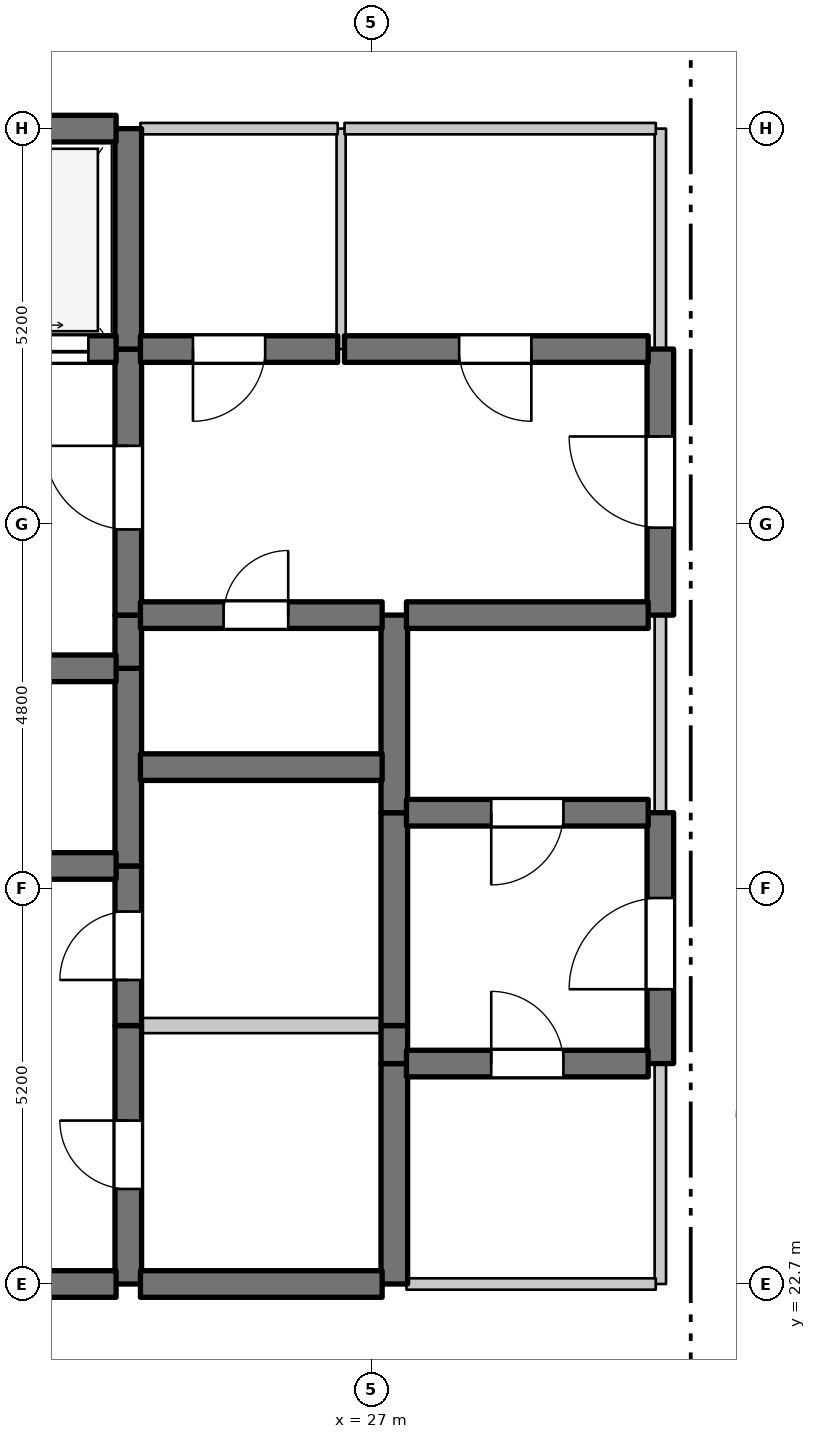
"""IFC4 building model, lengths in metres.
Left out: names, types, materials, properties, quantities, classifications, styles, units other than length and angle.
Written with IfcOpenShell. Run it as: python <this file> out.ifc"""

import sys

from ifc_helpers import new_model, si_unit, direction, frame, frame_2d, origin, place, context, subcontext, project, spatial, rectangle, extrude, element, fill, save


model = new_model("IFC4")
c1 = context("Model", 3, precision=1e-05, world=origin(), true_north=direction((0.0, 1.0)))
c2 = subcontext(c1, "Body", "Model", "MODEL_VIEW")
j1 = project(units=[si_unit("LENGTHUNIT", "METRE"), si_unit("PLANEANGLEUNIT", "RADIAN")], contexts=[c1])
p1 = place(None, origin())
s1 = spatial("IfcSite", under=j1, at=p1, CompositionType="ELEMENT")
p2 = place(p1, origin())
s2 = spatial("IfcBuilding", under=s1, at=p2, CompositionType="ELEMENT")
p3 = place(p2, frame((0.0, 0.0, 314.7)))
s3 = spatial("IfcBuildingStorey", under=s2, at=p3, CompositionType="ELEMENT", Elevation=314.7)
p4 = place(p3, frame((23.8, 22.7, 0.0), z_axis=(0.0, 0.0, 1.0), x_axis=(0.0, 1.0, 0.0)))
e1 = element("IfcWall", 1, at=p4, inside=s3, PredefinedType="SHEAR", context=c2, shape_type="SweptSolid", body=[
    extrude(rectangle(XDim=3.4, YDim=0.35, at=frame_2d((1.7, 0.0))), origin(), (0.0, 0.0, 1.0), 4.99),
])
p5 = place(p4, frame((1.25, 0.0, 0.0)))
e2 = element("IfcOpeningElement", 2, at=p5, cuts=e1, PredefinedType="OPENING", context=c2, shape_type="SweptSolid", body=[
    extrude(rectangle(XDim=0.9, YDim=2.15, at=frame_2d((0.45, 1.075))), frame((0.0, 0.185, 0.0), z_axis=(0.0, -1.0, 0.0), x_axis=(1.0, 0.0, 0.0)), (0.0, 0.0, 1.0), 0.37),
])
p6 = place(p3, frame((23.8, 26.1, 0.0), z_axis=(0.0, 0.0, 1.0), x_axis=(0.0, 1.0, 0.0)))
e3 = element("IfcWall", 3, at=p6, inside=s3, PredefinedType="SHEAR", context=c2, shape_type="SweptSolid", body=[
    extrude(rectangle(XDim=2.1, YDim=0.35, at=frame_2d((1.05, 0.0))), origin(), (0.0, 0.0, 1.0), 4.99),
])
p7 = place(p6, frame((0.6, 0.0, 0.0)))
e4 = element("IfcOpeningElement", 4, at=p7, cuts=e3, PredefinedType="OPENING", context=c2, shape_type="SweptSolid", body=[
    extrude(rectangle(XDim=0.9, YDim=2.15, at=frame_2d((0.45, 1.075))), frame((0.0, 0.185, 0.0), z_axis=(0.0, -1.0, 0.0), x_axis=(1.0, 0.0, 0.0)), (0.0, 0.0, 1.0), 0.37),
])
p8 = place(p3, frame((23.8, 28.2, 0.0), z_axis=(0.0, 0.0, 1.0), x_axis=(0.0, 1.0, 0.0)))
e5 = element("IfcWall", 5, at=p8, inside=s3, PredefinedType="SHEAR", context=c2, shape_type="SweptSolid", body=[
    extrude(rectangle(XDim=2.6, YDim=0.35, at=frame_2d((1.3, 0.0))), origin(), (0.0, 0.0, 1.0), 4.99),
])
p9 = place(p3, frame((23.8, 30.8, 0.0), z_axis=(0.0, 0.0, 1.0), x_axis=(0.0, 1.0, 0.0)))
e6 = element("IfcWall", 6, at=p9, inside=s3, PredefinedType="SHEAR", context=c2, shape_type="SweptSolid", body=[
    extrude(rectangle(XDim=0.7, YDim=0.35, at=frame_2d((0.35, 0.0))), origin(), (0.0, 0.0, 1.0), 4.99),
])
p10 = place(p3, frame((23.8, 31.5, 0.0), z_axis=(0.0, 0.0, 1.0), x_axis=(0.0, 1.0, 0.0)))
e7 = element("IfcWall", 7, at=p10, inside=s3, PredefinedType="SHEAR", context=c2, shape_type="SweptSolid", body=[
    extrude(rectangle(XDim=3.5, YDim=0.35, at=frame_2d((1.75, 0.0))), origin(), (0.0, 0.0, 1.0), 4.99),
])
p11 = place(p10, frame((1.127, 0.0, 0.0)))
e8 = element("IfcOpeningElement", 8, at=p11, cuts=e7, PredefinedType="OPENING", context=c2, shape_type="SweptSolid", body=[
    extrude(rectangle(XDim=1.1, YDim=2.15, at=frame_2d((0.55, 1.075))), frame((0.0, 0.185, 0.0), z_axis=(0.0, -1.0, 0.0), x_axis=(1.0, 0.0, 0.0)), (0.0, 0.0, 1.0), 0.37),
])
p12 = place(p3, frame((23.8, 35.0, 0.0), z_axis=(0.0, 0.0, 1.0), x_axis=(0.0, 1.0, 0.0)))
e9 = element("IfcWall", 9, at=p12, inside=s3, PredefinedType="SHEAR", context=c2, shape_type="SweptSolid", body=[
    extrude(rectangle(XDim=2.9, YDim=0.35, at=frame_2d((1.45, 0.0))), origin(), (0.0, 0.0, 1.0), 4.99),
])
p13 = place(p3, frame((26.6, 35.0, 0.0), z_axis=(0.0, 0.0, 1.0), x_axis=(0.0, 1.0, 0.0)))
e10 = element("IfcWall", 10, at=p13, inside=s3, PredefinedType="PARTITIONING", context=c2, shape_type="SweptSolid", body=[
    extrude(rectangle(XDim=2.9, YDim=0.12, at=frame_2d((1.45, 0.0))), origin(), (0.0, 0.0, 1.0), 4.99),
])
p14 = place(p3, frame((27.3, 22.7, 0.0), z_axis=(0.0, 0.0, 1.0), x_axis=(0.0, 1.0, 0.0)))
e11 = element("IfcWall", 11, at=p14, inside=s3, PredefinedType="SHEAR", context=c2, shape_type="SweptSolid", body=[
    extrude(rectangle(XDim=2.9, YDim=0.35, at=frame_2d((1.45, 0.0))), origin(), (0.0, 0.0, 1.0), 4.99),
])
p15 = place(p3, frame((27.3, 25.6, 0.0), z_axis=(0.0, 0.0, 1.0), x_axis=(0.0, 1.0, 0.0)))
e12 = element("IfcWall", 12, at=p15, inside=s3, PredefinedType="SHEAR", context=c2, shape_type="SweptSolid", body=[
    extrude(rectangle(XDim=0.5, YDim=0.35, at=frame_2d((0.25, 0.0))), origin(), (0.0, 0.0, 1.0), 4.99),
])
p16 = place(p3, frame((27.3, 26.1, 0.0), z_axis=(0.0, 0.0, 1.0), x_axis=(0.0, 1.0, 0.0)))
e13 = element("IfcWall", 13, at=p16, inside=s3, PredefinedType="SHEAR", context=c2, shape_type="SweptSolid", body=[
    extrude(rectangle(XDim=2.8, YDim=0.35, at=frame_2d((1.4, 0.0))), origin(), (0.0, 0.0, 1.0), 4.99),
])
p17 = place(p3, frame((27.3, 28.9, 0.0), z_axis=(0.0, 0.0, 1.0), x_axis=(0.0, 1.0, 0.0)))
e14 = element("IfcWall", 14, at=p17, inside=s3, PredefinedType="SHEAR", context=c2, shape_type="SweptSolid", body=[
    extrude(rectangle(XDim=2.6, YDim=0.35, at=frame_2d((1.3, 0.0))), origin(), (0.0, 0.0, 1.0), 4.99),
])
p18 = place(p3, frame((30.8, 22.7, 0.0), z_axis=(0.0, 0.0, 1.0), x_axis=(0.0, 1.0, 0.0)))
e15 = element("IfcWall", 15, at=p18, inside=s3, PredefinedType="STANDARD", context=c2, shape_type="SweptSolid", body=[
    extrude(rectangle(XDim=2.9, YDim=0.15, at=frame_2d((1.45, 0.0))), origin(), (0.0, 0.0, 1.0), 4.99),
])
p19 = place(p3, frame((30.8, 25.6, 0.0), z_axis=(0.0, 0.0, 1.0), x_axis=(0.0, 1.0, 0.0)))
e16 = element("IfcWall", 16, at=p19, inside=s3, PredefinedType="SHEAR", context=c2, shape_type="SweptSolid", body=[
    extrude(rectangle(XDim=3.3, YDim=0.35, at=frame_2d((1.65, 0.0))), origin(), (0.0, 0.0, 1.0), 4.99),
])
p20 = place(p19, frame((0.978, 0.0, 0.0)))
e17 = element("IfcOpeningElement", 17, at=p20, cuts=e16, PredefinedType="OPENING", context=c2, shape_type="SweptSolid", body=[
    extrude(rectangle(XDim=1.2, YDim=2.2, at=frame_2d((0.6, 1.1))), frame((0.0, 0.185, 0.0), z_axis=(0.0, -1.0, 0.0), x_axis=(1.0, 0.0, 0.0)), (0.0, 0.0, 1.0), 0.37),
])
p21 = place(p3, frame((30.8, 28.9, 0.0), z_axis=(0.0, 0.0, 1.0), x_axis=(0.0, 1.0, 0.0)))
e18 = element("IfcWall", 18, at=p21, inside=s3, PredefinedType="STANDARD", context=c2, shape_type="SweptSolid", body=[
    extrude(rectangle(XDim=2.6, YDim=0.15, at=frame_2d((1.3, 0.0))), origin(), (0.0, 0.0, 1.0), 4.99),
])
p22 = place(p3, frame((30.8, 31.5, 0.0), z_axis=(0.0, 0.0, 1.0), x_axis=(0.0, 1.0, 0.0)))
e19 = element("IfcWall", 19, at=p22, inside=s3, PredefinedType="SHEAR", context=c2, shape_type="SweptSolid", body=[
    extrude(rectangle(XDim=3.5, YDim=0.35, at=frame_2d((1.75, 0.0))), origin(), (0.0, 0.0, 1.0), 4.99),
])
p23 = place(p22, frame((1.15, 0.0, 0.0)))
e20 = element("IfcOpeningElement", 20, at=p23, cuts=e19, PredefinedType="OPENING", context=c2, shape_type="SweptSolid", body=[
    extrude(rectangle(XDim=1.2, YDim=2.2, at=frame_2d((0.6, 1.1))), frame((0.0, 0.185, 0.0), z_axis=(0.0, -1.0, 0.0), x_axis=(1.0, 0.0, 0.0)), (0.0, 0.0, 1.0), 0.37),
])
p24 = place(p3, frame((30.8, 35.0, 0.0), z_axis=(0.0, 0.0, 1.0), x_axis=(0.0, 1.0, 0.0)))
e21 = element("IfcWall", 21, at=p24, inside=s3, PredefinedType="STANDARD", context=c2, shape_type="SweptSolid", body=[
    extrude(rectangle(XDim=2.9, YDim=0.15, at=frame_2d((1.45, 0.0))), origin(), (0.0, 0.0, 1.0), 4.99),
])
p25 = place(p3, frame((19.16, 22.7, 0.0), z_axis=(0.0, 0.0, 1.0), x_axis=(1.0, 0.0, 0.0)))
e22 = element("IfcWall", 22, at=p25, inside=s3, PredefinedType="SHEAR", context=c2, shape_type="SweptSolid", body=[
    extrude(rectangle(XDim=4.48, YDim=0.35, at=frame_2d((2.24, 0.0))), origin(), (0.0, 0.0, 1.0), 4.99),
])
p26 = place(p25, frame((1.64, 0.0, 0.0)))
e23 = element("IfcOpeningElement", 23, at=p26, cuts=e22, PredefinedType="OPENING", context=c2, shape_type="SweptSolid", body=[
    extrude(rectangle(XDim=1.2, YDim=2.2, at=frame_2d((0.6, 1.1))), frame((0.0, 0.185, 0.0), z_axis=(0.0, -1.0, 0.0), x_axis=(1.0, 0.0, 0.0)), (0.0, 0.0, 1.0), 0.37),
])
p27 = place(p3, frame((23.96, 22.7, 0.0), z_axis=(0.0, 0.0, 1.0), x_axis=(1.0, 0.0, 0.0)))
e24 = element("IfcWall", 24, at=p27, inside=s3, PredefinedType="SHEAR", context=c2, shape_type="SweptSolid", body=[
    extrude(rectangle(XDim=3.18, YDim=0.35, at=frame_2d((1.59, 0.0))), origin(), (0.0, 0.0, 1.0), 4.99),
])
p28 = place(p3, frame((27.46, 22.7, 0.0), z_axis=(0.0, 0.0, 1.0), x_axis=(1.0, 0.0, 0.0)))
e25 = element("IfcWall", 25, at=p28, inside=s3, PredefinedType="STANDARD", context=c2, shape_type="SweptSolid", body=[
    extrude(rectangle(XDim=3.28, YDim=0.15, at=frame_2d((1.64, 0.0))), origin(), (0.0, 0.0, 1.0), 4.99),
])
p29 = place(p3, frame((27.46, 25.6, 0.0), z_axis=(0.0, 0.0, 1.0), x_axis=(1.0, 0.0, 0.0)))
e26 = element("IfcWall", 26, at=p29, inside=s3, PredefinedType="SHEAR", context=c2, shape_type="SweptSolid", body=[
    extrude(rectangle(XDim=3.18, YDim=0.35, at=frame_2d((1.59, 0.0))), origin(), (0.0, 0.0, 1.0), 4.99),
])
p30 = place(p29, frame((1.115, 0.0, 0.0)))
e27 = element("IfcOpeningElement", 27, at=p30, cuts=e26, PredefinedType="OPENING", context=c2, shape_type="SweptSolid", body=[
    extrude(rectangle(XDim=0.95, YDim=2.15, at=frame_2d((0.475, 1.075))), frame((0.0, 0.185, 0.0), z_axis=(0.0, -1.0, 0.0), x_axis=(1.0, 0.0, 0.0)), (0.0, 0.0, 1.0), 0.37),
])
p31 = place(p3, frame((23.96, 26.1, 0.0), z_axis=(0.0, 0.0, 1.0), x_axis=(1.0, 0.0, 0.0)))
e28 = element("IfcWall", 28, at=p31, inside=s3, PredefinedType="STANDARD", context=c2, shape_type="SweptSolid", body=[
    extrude(rectangle(XDim=3.18, YDim=0.2, at=frame_2d((1.59, 0.0))), origin(), (0.0, 0.0, 1.0), 4.99),
])
p32 = place(p3, frame((19.16, 28.2, 0.0), z_axis=(0.0, 0.0, 1.0), x_axis=(1.0, 0.0, 0.0)))
e29 = element("IfcWall", 29, at=p32, inside=s3, PredefinedType="SHEAR", context=c2, shape_type="SweptSolid", body=[
    extrude(rectangle(XDim=4.48, YDim=0.35, at=frame_2d((2.24, 0.0))), origin(), (0.0, 0.0, 1.0), 4.99),
])
p33 = place(p32, frame((1.79, 0.0, 0.0)))
e30 = element("IfcOpeningElement", 30, at=p33, cuts=e29, PredefinedType="OPENING", context=c2, shape_type="SweptSolid", body=[
    extrude(rectangle(XDim=0.9, YDim=2.15, at=frame_2d((0.45, 1.075))), frame((0.0, 0.185, 0.0), z_axis=(0.0, -1.0, 0.0), x_axis=(1.0, 0.0, 0.0)), (0.0, 0.0, 1.0), 0.37),
])
p34 = place(p3, frame((27.46, 28.9, 0.0), z_axis=(0.0, 0.0, 1.0), x_axis=(1.0, 0.0, 0.0)))
e31 = element("IfcWall", 31, at=p34, inside=s3, PredefinedType="SHEAR", context=c2, shape_type="SweptSolid", body=[
    extrude(rectangle(XDim=3.18, YDim=0.35, at=frame_2d((1.59, 0.0))), origin(), (0.0, 0.0, 1.0), 4.99),
])
p35 = place(p34, frame((1.115, 0.0, 0.0)))
e32 = element("IfcOpeningElement", 32, at=p35, cuts=e31, PredefinedType="OPENING", context=c2, shape_type="SweptSolid", body=[
    extrude(rectangle(XDim=0.95, YDim=2.15, at=frame_2d((0.475, 1.075))), frame((0.0, 0.185, 0.0), z_axis=(0.0, -1.0, 0.0), x_axis=(1.0, 0.0, 0.0)), (0.0, 0.0, 1.0), 0.37),
])
p36 = place(p3, frame((23.96, 29.5, 0.0), z_axis=(0.0, 0.0, 1.0), x_axis=(1.0, 0.0, 0.0)))
e33 = element("IfcWall", 33, at=p36, inside=s3, PredefinedType="SHEAR", context=c2, shape_type="SweptSolid", body=[
    extrude(rectangle(XDim=3.18, YDim=0.35, at=frame_2d((1.59, 0.0))), origin(), (0.0, 0.0, 1.0), 4.99),
])
p37 = place(p3, frame((19.16, 30.8, 0.0), z_axis=(0.0, 0.0, 1.0), x_axis=(1.0, 0.0, 0.0)))
e34 = element("IfcWall", 34, at=p37, inside=s3, PredefinedType="SHEAR", context=c2, shape_type="SweptSolid", body=[
    extrude(rectangle(XDim=4.48, YDim=0.35, at=frame_2d((2.24, 0.0))), origin(), (0.0, 0.0, 1.0), 4.99),
])
p38 = place(p3, frame((23.96, 31.5, 0.0), z_axis=(0.0, 0.0, 1.0), x_axis=(1.0, 0.0, 0.0)))
e35 = element("IfcWall", 35, at=p38, inside=s3, PredefinedType="SHEAR", context=c2, shape_type="SweptSolid", body=[
    extrude(rectangle(XDim=3.18, YDim=0.35, at=frame_2d((1.59, 0.0))), origin(), (0.0, 0.0, 1.0), 4.99),
])
p39 = place(p38, frame((1.094, 0.0, 0.0)))
e36 = element("IfcOpeningElement", 36, at=p39, cuts=e35, PredefinedType="OPENING", context=c2, shape_type="SweptSolid", body=[
    extrude(rectangle(XDim=0.85, YDim=2.1, at=frame_2d((0.425, 1.05))), frame((0.0, 0.185, 0.0), z_axis=(0.0, -1.0, 0.0), x_axis=(1.0, 0.0, 0.0)), (0.0, 0.0, 1.0), 0.37),
])
p40 = place(p3, frame((27.46, 31.5, 0.0), z_axis=(0.0, 0.0, 1.0), x_axis=(1.0, 0.0, 0.0)))
e37 = element("IfcWall", 37, at=p40, inside=s3, PredefinedType="SHEAR", context=c2, shape_type="SweptSolid", body=[
    extrude(rectangle(XDim=3.18, YDim=0.35, at=frame_2d((1.59, 0.0))), origin(), (0.0, 0.0, 1.0), 4.99),
])
p41 = place(p3, frame((19.16, 35.0, 0.0), z_axis=(0.0, 0.0, 1.0), x_axis=(1.0, 0.0, 0.0)))
e38 = element("IfcWall", 38, at=p41, inside=s3, PredefinedType="SHEAR", context=c2, shape_type="SweptSolid", body=[
    extrude(rectangle(XDim=4.48, YDim=0.35, at=frame_2d((2.24, 0.0))), origin(), (0.0, 0.0, 1.0), 4.99),
])
p42 = place(p41, frame((0.365, 0.0, 0.0)))
e39 = element("IfcOpeningElement", 39, at=p42, cuts=e38, PredefinedType="OPENING", context=c2, shape_type="SweptSolid", body=[
    extrude(rectangle(XDim=1.35, YDim=2.2, at=frame_2d((0.675, 1.1))), frame((0.0, 0.185, 0.0), z_axis=(0.0, -1.0, 0.0), x_axis=(1.0, 0.0, 0.0)), (0.0, 0.0, 1.0), 0.37),
])
p43 = place(p41, frame((2.765, 0.0, 0.0)))
e40 = element("IfcOpeningElement", 40, at=p43, cuts=e38, PredefinedType="OPENING", context=c2, shape_type="SweptSolid", body=[
    extrude(rectangle(XDim=1.35, YDim=2.2, at=frame_2d((0.675, 1.1))), frame((0.0, 0.185, 0.0), z_axis=(0.0, -1.0, 0.0), x_axis=(1.0, 0.0, 0.0)), (0.0, 0.0, 1.0), 0.37),
])
p44 = place(p3, frame((23.96, 35.0, 0.0), z_axis=(0.0, 0.0, 1.0), x_axis=(1.0, 0.0, 0.0)))
e41 = element("IfcWall", 41, at=p44, inside=s3, PredefinedType="SHEAR", context=c2, shape_type="SweptSolid", body=[
    extrude(rectangle(XDim=2.595, YDim=0.35, at=frame_2d((1.297, 0.0))), origin(), (0.0, 0.0, 1.0), 4.99),
])
p45 = place(p44, frame((0.691, 0.0, 0.0)))
e42 = element("IfcOpeningElement", 42, at=p45, cuts=e41, PredefinedType="OPENING", context=c2, shape_type="SweptSolid", body=[
    extrude(rectangle(XDim=0.95, YDim=2.15, at=frame_2d((0.475, 1.075))), frame((0.0, 0.185, 0.0), z_axis=(0.0, -1.0, 0.0), x_axis=(1.0, 0.0, 0.0)), (0.0, 0.0, 1.0), 0.37),
])
p46 = place(p3, frame((26.645, 35.0, 0.0), z_axis=(0.0, 0.0, 1.0), x_axis=(1.0, 0.0, 0.0)))
e43 = element("IfcWall", 43, at=p46, inside=s3, PredefinedType="SHEAR", context=c2, shape_type="SweptSolid", body=[
    extrude(rectangle(XDim=3.995, YDim=0.35, at=frame_2d((1.998, 0.0))), origin(), (0.0, 0.0, 1.0), 4.99),
])
p47 = place(p46, frame((1.508, 0.0, 0.0)))
e44 = element("IfcOpeningElement", 44, at=p47, cuts=e43, PredefinedType="OPENING", context=c2, shape_type="SweptSolid", body=[
    extrude(rectangle(XDim=0.95, YDim=2.15, at=frame_2d((0.475, 1.075))), frame((0.0, 0.185, 0.0), z_axis=(0.0, -1.0, 0.0), x_axis=(1.0, 0.0, 0.0)), (0.0, 0.0, 1.0), 0.37),
])
p48 = place(p3, frame((19.16, 37.9, 0.0), z_axis=(0.0, 0.0, 1.0), x_axis=(1.0, 0.0, 0.0)))
e45 = element("IfcWall", 45, at=p48, inside=s3, PredefinedType="SHEAR", context=c2, shape_type="SweptSolid", body=[
    extrude(rectangle(XDim=4.48, YDim=0.35, at=frame_2d((2.24, 0.0))), origin(), (0.0, 0.0, 1.0), 4.99),
])
p49 = place(p3, frame((23.96, 37.9, 0.0), z_axis=(0.0, 0.0, 1.0), x_axis=(1.0, 0.0, 0.0)))
e46 = element("IfcWall", 46, at=p49, inside=s3, PredefinedType="STANDARD", context=c2, shape_type="SweptSolid", body=[
    extrude(rectangle(XDim=2.595, YDim=0.15, at=frame_2d((1.297, 0.0))), origin(), (0.0, 0.0, 1.0), 4.49),
])
p50 = place(p3, frame((26.645, 37.9, 0.0), z_axis=(0.0, 0.0, 1.0), x_axis=(1.0, 0.0, 0.0)))
e47 = element("IfcWall", 47, at=p50, inside=s3, PredefinedType="STANDARD", context=c2, shape_type="SweptSolid", body=[
    extrude(rectangle(XDim=4.095, YDim=0.15, at=frame_2d((2.047, 0.0))), origin(), (0.0, 0.0, 1.0), 4.49),
])
p51 = place(p5, origin())
e48 = element("IfcDoor", 48, at=p51, inside=s3, OperationType="SINGLE_SWING_RIGHT", PredefinedType="DOOR", context=c2, shape_type="SweptSolid", body=[
    extrude(rectangle(XDim=0.9, YDim=2.15, at=frame_2d((0.45, 1.075))), frame((0.0, 0.025, 0.0), z_axis=(0.0, -1.0, 0.0), x_axis=(1.0, 0.0, 0.0)), (0.0, 0.0, 1.0), 0.05),
])
fill(e2, e48)
p52 = place(p7, origin())
e49 = element("IfcDoor", 49, at=p52, inside=s3, OperationType="SINGLE_SWING_LEFT", PredefinedType="DOOR", context=c2, shape_type="SweptSolid", body=[
    extrude(rectangle(XDim=0.9, YDim=2.15, at=frame_2d((0.45, 1.075))), frame((0.0, 0.025, 0.0), z_axis=(0.0, -1.0, 0.0), x_axis=(1.0, 0.0, 0.0)), (0.0, 0.0, 1.0), 0.05),
])
fill(e4, e49)
p53 = place(p11, origin())
e50 = element("IfcDoor", 50, at=p53, inside=s3, OperationType="SINGLE_SWING_RIGHT", PredefinedType="DOOR", context=c2, shape_type="SweptSolid", body=[
    extrude(rectangle(XDim=1.1, YDim=2.15, at=frame_2d((0.55, 1.075))), frame((0.0, 0.025, 0.0), z_axis=(0.0, -1.0, 0.0), x_axis=(1.0, 0.0, 0.0)), (0.0, 0.0, 1.0), 0.05),
])
fill(e8, e50)
p54 = place(p20, origin())
e51 = element("IfcDoor", 51, at=p54, inside=s3, OperationType="SINGLE_SWING_LEFT", PredefinedType="DOOR", context=c2, shape_type="SweptSolid", body=[
    extrude(rectangle(XDim=1.2, YDim=2.2, at=frame_2d((0.6, 1.1))), frame((0.0, 0.025, 0.0), z_axis=(0.0, -1.0, 0.0), x_axis=(1.0, 0.0, 0.0)), (0.0, 0.0, 1.0), 0.05),
])
fill(e17, e51)
p55 = place(p23, origin())
e52 = element("IfcDoor", 52, at=p55, inside=s3, OperationType="SINGLE_SWING_RIGHT", PredefinedType="DOOR", context=c2, shape_type="SweptSolid", body=[
    extrude(rectangle(XDim=1.2, YDim=2.2, at=frame_2d((0.6, 1.1))), frame((0.0, 0.025, 0.0), z_axis=(0.0, -1.0, 0.0), x_axis=(1.0, 0.0, 0.0)), (0.0, 0.0, 1.0), 0.05),
])
fill(e20, e52)
p56 = place(p30, origin())
e53 = element("IfcDoor", 53, at=p56, inside=s3, OperationType="SINGLE_SWING_LEFT", PredefinedType="DOOR", context=c2, shape_type="SweptSolid", body=[
    extrude(rectangle(XDim=0.95, YDim=2.15, at=frame_2d((0.475, 1.075))), frame((0.0, 0.025, 0.0), z_axis=(0.0, -1.0, 0.0), x_axis=(1.0, 0.0, 0.0)), (0.0, 0.0, 1.0), 0.05),
])
fill(e27, e53)
p57 = place(p35, frame((0.95, 0.0, 0.0), z_axis=(0.0, 0.0, 1.0), x_axis=(-1.0, 0.0, 0.0)))
e54 = element("IfcDoor", 54, at=p57, inside=s3, OperationType="SINGLE_SWING_LEFT", PredefinedType="DOOR", context=c2, shape_type="SweptSolid", body=[
    extrude(rectangle(XDim=0.95, YDim=2.15, at=frame_2d((0.475, 1.075))), frame((0.0, 0.025, 0.0), z_axis=(0.0, -1.0, 0.0), x_axis=(1.0, 0.0, 0.0)), (0.0, 0.0, 1.0), 0.05),
])
fill(e32, e54)
p58 = place(p39, origin())
e55 = element("IfcDoor", 55, at=p58, inside=s3, OperationType="SINGLE_SWING_RIGHT", PredefinedType="DOOR", context=c2, shape_type="SweptSolid", body=[
    extrude(rectangle(XDim=0.85, YDim=2.1, at=frame_2d((0.425, 1.05))), frame((0.0, 0.025, 0.0), z_axis=(0.0, -1.0, 0.0), x_axis=(1.0, 0.0, 0.0)), (0.0, 0.0, 1.0), 0.05),
])
fill(e36, e55)
p59 = place(p43, origin())
e56 = element("IfcDoor", 56, at=p59, inside=s3, OperationType="DOUBLE_DOOR_SLIDING", PredefinedType="DOOR", context=c2, shape_type="SweptSolid", body=[
    extrude(rectangle(XDim=1.35, YDim=2.2, at=frame_2d((0.675, 1.1))), frame((0.0, 0.025, 0.0), z_axis=(0.0, -1.0, 0.0), x_axis=(1.0, 0.0, 0.0)), (0.0, 0.0, 1.0), 0.05),
])
fill(e40, e56)
p60 = place(p45, frame((0.95, 0.0, 0.0), z_axis=(0.0, 0.0, 1.0), x_axis=(-1.0, 0.0, 0.0)))
e57 = element("IfcDoor", 57, at=p60, inside=s3, OperationType="SINGLE_SWING_LEFT", PredefinedType="DOOR", context=c2, shape_type="SweptSolid", body=[
    extrude(rectangle(XDim=0.95, YDim=2.15, at=frame_2d((0.475, 1.075))), frame((0.0, 0.025, 0.0), z_axis=(0.0, -1.0, 0.0), x_axis=(1.0, 0.0, 0.0)), (0.0, 0.0, 1.0), 0.05),
])
fill(e42, e57)
p61 = place(p47, frame((0.95, 0.0, 0.0), z_axis=(0.0, 0.0, 1.0), x_axis=(-1.0, 0.0, 0.0)))
e58 = element("IfcDoor", 58, at=p61, inside=s3, OperationType="SINGLE_SWING_RIGHT", PredefinedType="DOOR", context=c2, shape_type="SweptSolid", body=[
    extrude(rectangle(XDim=0.95, YDim=2.15, at=frame_2d((0.475, 1.075))), frame((0.0, 0.025, 0.0), z_axis=(0.0, -1.0, 0.0), x_axis=(1.0, 0.0, 0.0)), (0.0, 0.0, 1.0), 0.05),
])
fill(e44, e58)
save(model, sys.argv[1])
